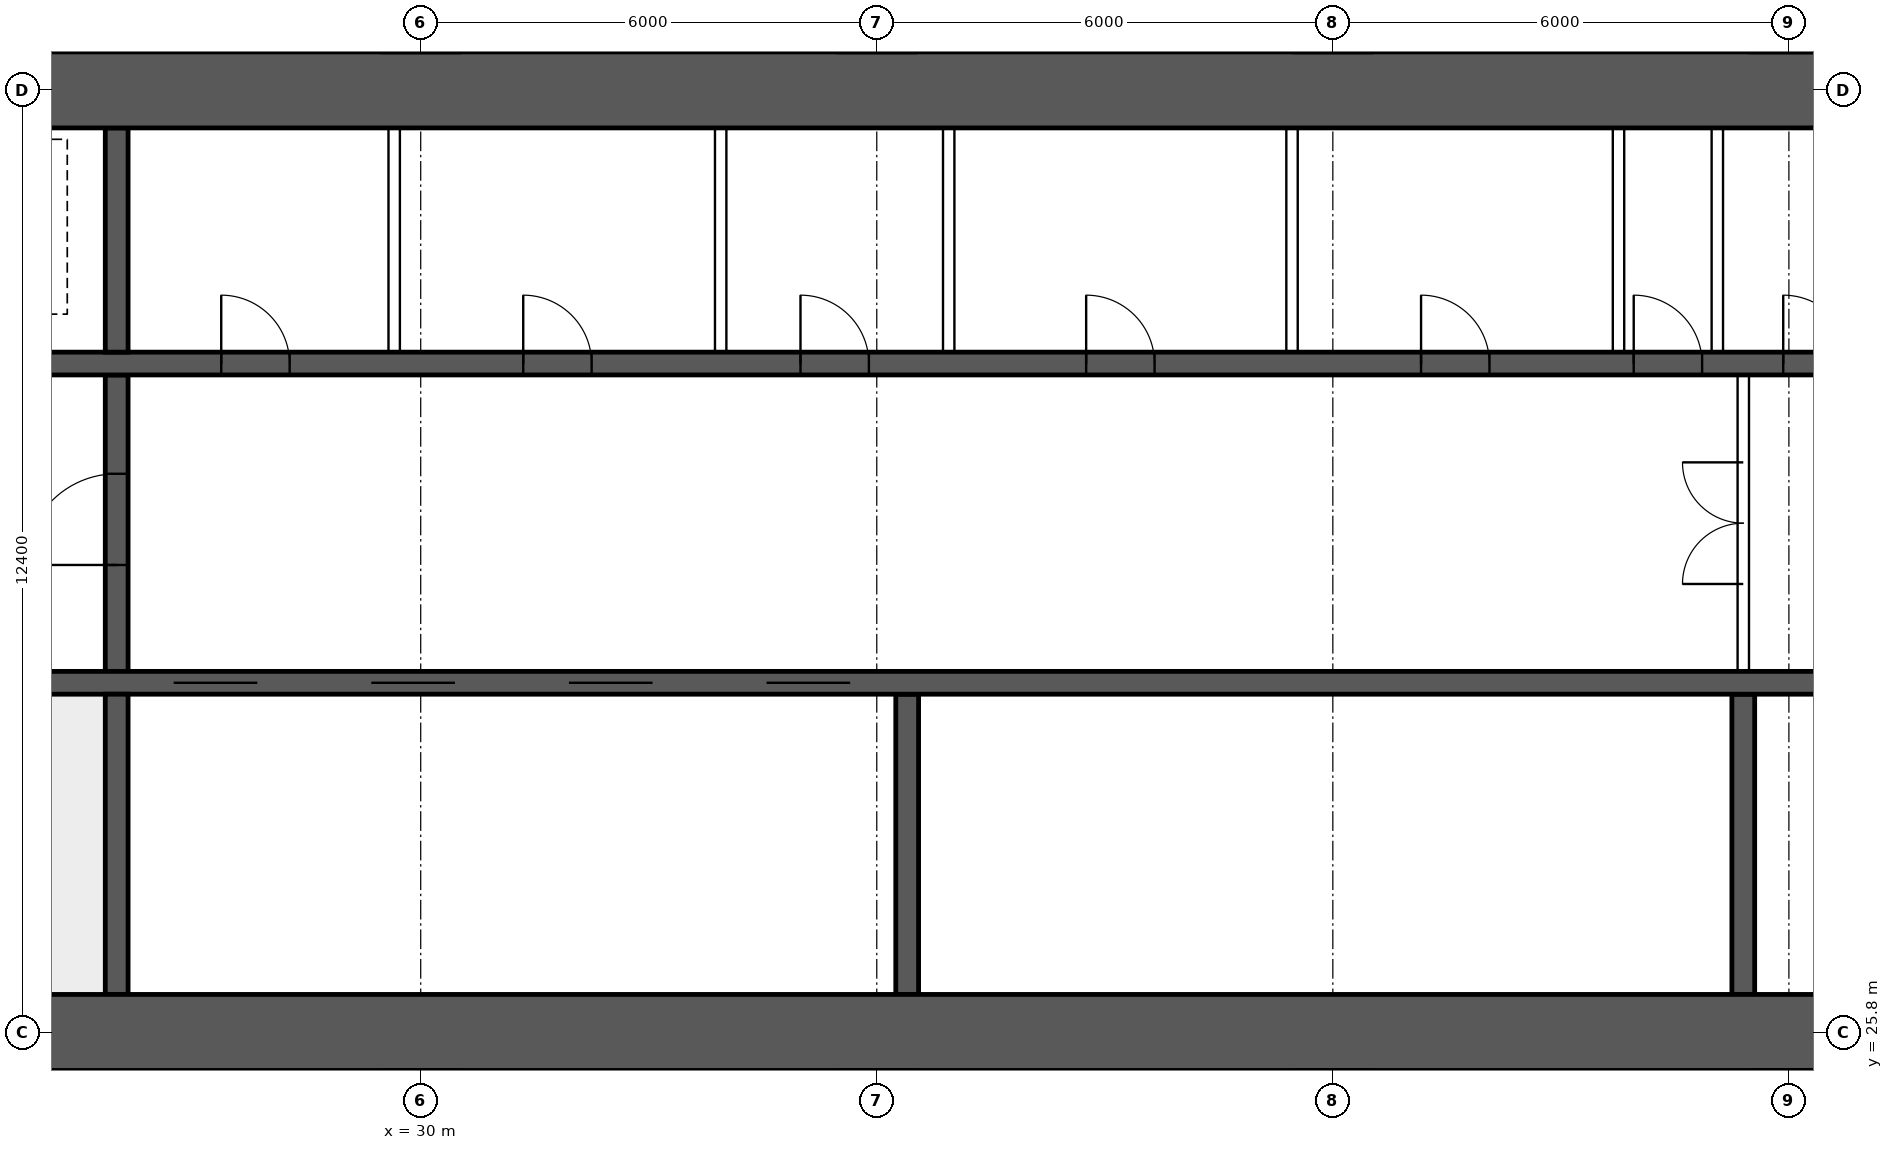
"""IFC4 building model, lengths in metres.
Left out: names, types, materials, properties, quantities, classifications, styles, units other than length and angle.
Written with IfcOpenShell. Run it as: python <this file> out.ifc"""

import sys

from ifc_helpers import new_model, si_unit, direction, frame, frame_2d, origin, place, context, subcontext, project, spatial, rectangle, extrude, element, fill, save


model = new_model("IFC4")
c1 = context("Model", 3, precision=1e-05, world=origin(), true_north=direction((0.0, 1.0)))
c2 = subcontext(c1, "Body", "Model", "MODEL_VIEW")
j1 = project(units=[si_unit("LENGTHUNIT", "METRE"), si_unit("PLANEANGLEUNIT", "RADIAN")], contexts=[c1])
p1 = place(None, origin())
s1 = spatial("IfcSite", under=j1, at=p1, CompositionType="ELEMENT")
p2 = place(p1, origin())
s2 = spatial("IfcBuilding", under=s1, at=p2, CompositionType="ELEMENT")
p3 = place(p2, frame((0.0, 0.0, 31.45)))
s3 = spatial("IfcBuildingStorey", under=s2, at=p3, CompositionType="ELEMENT", Elevation=31.45)
for number, where, z_axis, x_axis in (
    (1, (18.0, 25.8, 0.0), (0.0, 0.0, 1.0), (1.0, 0.0, 0.0)),
    (2, (18.0, 38.2, 0.0), (0.0, 0.0, 1.0), (1.0, 0.0, 0.0)),
):
    element("IfcWall", number, at=place(p3, frame(where, z_axis=z_axis, x_axis=x_axis)), inside=s3, PredefinedType="SHEAR", context=c2, shape_type="SweptSolid", body=[
        extrude(rectangle(XDim=48.0, YDim=1.0, at=frame_2d((24.0, 0.0))), origin(), (0.0, 0.0, 1.0), 3.75),
    ])
p4 = place(p3, frame((18.5, 30.4, 0.0), z_axis=(0.0, 0.0, 1.0), x_axis=(1.0, 0.0, 0.0)))
e3 = element("IfcWall", 3, at=p4, inside=s3, PredefinedType="SHEAR", context=c2, shape_type="SweptSolid", body=[
    extrude(rectangle(XDim=47.0, YDim=0.3, at=frame_2d((23.5, 0.0))), origin(), (0.0, 0.0, 1.0), 3.75),
])
p5 = place(p4, frame((0.4, 0.0, 0.0)))
e4 = element("IfcOpeningElement", 4, at=p5, cuts=e3, PredefinedType="OPENING", context=c2, shape_type="SweptSolid", body=[
    extrude(rectangle(XDim=1.0, YDim=2.1, at=frame_2d((0.5, 1.05))), frame((0.0, 0.16, 0.0), z_axis=(0.0, -1.0, 0.0), x_axis=(1.0, 0.0, 0.0)), (0.0, 0.0, 1.0), 0.32),
])
p6 = place(p4, frame((45.6, 0.0, 0.0)))
e5 = element("IfcOpeningElement", 5, at=p6, cuts=e3, PredefinedType="OPENING", context=c2, shape_type="SweptSolid", body=[
    extrude(rectangle(XDim=1.0, YDim=2.1, at=frame_2d((0.5, 1.05))), frame((0.0, 0.16, 0.0), z_axis=(0.0, -1.0, 0.0), x_axis=(1.0, 0.0, 0.0)), (0.0, 0.0, 1.0), 0.32),
])
p7 = place(p4, frame((8.25, 0.0, 0.0)))
e6 = element("IfcOpeningElement", 6, at=p7, cuts=e3, PredefinedType="OPENING", context=c2, shape_type="SweptSolid", body=[
    extrude(rectangle(XDim=1.1, YDim=2.1, at=frame_2d((0.55, 1.05))), frame((0.0, 0.16, 0.0), z_axis=(0.0, -1.0, 0.0), x_axis=(1.0, 0.0, 0.0)), (0.0, 0.0, 1.0), 0.32),
])
p8 = place(p4, frame((10.85, 0.0, 0.0)))
e7 = element("IfcOpeningElement", 7, at=p8, cuts=e3, PredefinedType="OPENING", context=c2, shape_type="SweptSolid", body=[
    extrude(rectangle(XDim=1.1, YDim=2.1, at=frame_2d((0.55, 1.05))), frame((0.0, 0.16, 0.0), z_axis=(0.0, -1.0, 0.0), x_axis=(1.0, 0.0, 0.0)), (0.0, 0.0, 1.0), 0.32),
])
p9 = place(p4, frame((13.45, 0.0, 0.0)))
e8 = element("IfcOpeningElement", 8, at=p9, cuts=e3, PredefinedType="OPENING", context=c2, shape_type="SweptSolid", body=[
    extrude(rectangle(XDim=1.1, YDim=2.1, at=frame_2d((0.55, 1.05))), frame((0.0, 0.16, 0.0), z_axis=(0.0, -1.0, 0.0), x_axis=(1.0, 0.0, 0.0)), (0.0, 0.0, 1.0), 0.32),
])
p10 = place(p4, frame((16.05, 0.0, 0.0)))
e9 = element("IfcOpeningElement", 9, at=p10, cuts=e3, PredefinedType="OPENING", context=c2, shape_type="SweptSolid", body=[
    extrude(rectangle(XDim=1.1, YDim=2.1, at=frame_2d((0.55, 1.05))), frame((0.0, 0.16, 0.0), z_axis=(0.0, -1.0, 0.0), x_axis=(1.0, 0.0, 0.0)), (0.0, 0.0, 1.0), 0.32),
])
p11 = place(p4, frame((30.117, 0.0, 0.0)))
e10 = element("IfcOpeningElement", 10, at=p11, cuts=e3, PredefinedType="OPENING", context=c2, shape_type="SweptSolid", body=[
    extrude(rectangle(XDim=1.1, YDim=2.1, at=frame_2d((0.55, 1.05))), frame((0.0, 0.16, 0.0), z_axis=(0.0, -1.0, 0.0), x_axis=(1.0, 0.0, 0.0)), (0.0, 0.0, 1.0), 0.32),
])
p12 = place(p4, frame((33.65, 0.0, 0.0)))
e11 = element("IfcOpeningElement", 11, at=p12, cuts=e3, PredefinedType="OPENING", context=c2, shape_type="SweptSolid", body=[
    extrude(rectangle(XDim=1.1, YDim=2.1, at=frame_2d((0.55, 1.05))), frame((0.0, 0.16, 0.0), z_axis=(0.0, -1.0, 0.0), x_axis=(1.0, 0.0, 0.0)), (0.0, 0.0, 1.0), 0.32),
])
p13 = place(p4, frame((37.183, 0.0, 0.0)))
e12 = element("IfcOpeningElement", 12, at=p13, cuts=e3, PredefinedType="OPENING", context=c2, shape_type="SweptSolid", body=[
    extrude(rectangle(XDim=1.1, YDim=2.1, at=frame_2d((0.55, 1.05))), frame((0.0, 0.16, 0.0), z_axis=(0.0, -1.0, 0.0), x_axis=(1.0, 0.0, 0.0)), (0.0, 0.0, 1.0), 0.32),
])
p14 = place(p3, frame((18.5, 34.6, 0.0), z_axis=(0.0, 0.0, 1.0), x_axis=(1.0, 0.0, 0.0)))
e13 = element("IfcWall", 13, at=p14, inside=s3, PredefinedType="SHEAR", context=c2, shape_type="SweptSolid", body=[
    extrude(rectangle(XDim=47.0, YDim=0.3, at=frame_2d((23.5, 0.0))), origin(), (0.0, 0.0, 1.0), 3.75),
])
p15 = place(p14, frame((0.9, 0.0, 0.0)))
e14 = element("IfcOpeningElement", 14, at=p15, cuts=e13, PredefinedType="OPENING", context=c2, shape_type="SweptSolid", body=[
    extrude(rectangle(XDim=1.1, YDim=2.1, at=frame_2d((0.55, 1.05))), frame((0.0, 0.16, 0.0), z_axis=(0.0, -1.0, 0.0), x_axis=(1.0, 0.0, 0.0)), (0.0, 0.0, 1.0), 0.32),
])
p16 = place(p14, frame((45.0, 0.0, 0.0)))
e15 = element("IfcOpeningElement", 15, at=p16, cuts=e13, PredefinedType="OPENING", context=c2, shape_type="SweptSolid", body=[
    extrude(rectangle(XDim=1.1, YDim=2.1, at=frame_2d((0.55, 1.05))), frame((0.0, 0.16, 0.0), z_axis=(0.0, -1.0, 0.0), x_axis=(1.0, 0.0, 0.0)), (0.0, 0.0, 1.0), 0.32),
])
p17 = place(p14, frame((4.1, 0.0, 0.0)))
e16 = element("IfcOpeningElement", 16, at=p17, cuts=e13, PredefinedType="OPENING", context=c2, shape_type="SweptSolid", body=[
    extrude(rectangle(XDim=0.9, YDim=2.1, at=frame_2d((0.45, 1.05))), frame((0.0, 0.16, 0.0), z_axis=(0.0, -1.0, 0.0), x_axis=(1.0, 0.0, 0.0)), (0.0, 0.0, 1.0), 0.32),
])
p18 = place(p14, frame((42.0, 0.0, 0.0)))
e17 = element("IfcOpeningElement", 17, at=p18, cuts=e13, PredefinedType="OPENING", context=c2, shape_type="SweptSolid", body=[
    extrude(rectangle(XDim=0.9, YDim=2.1, at=frame_2d((0.45, 1.05))), frame((0.0, 0.16, 0.0), z_axis=(0.0, -1.0, 0.0), x_axis=(1.0, 0.0, 0.0)), (0.0, 0.0, 1.0), 0.32),
])
p19 = place(p14, frame((8.875, 0.0, 0.0)))
e18 = element("IfcOpeningElement", 18, at=p19, cuts=e13, PredefinedType="OPENING", context=c2, shape_type="SweptSolid", body=[
    extrude(rectangle(XDim=0.9, YDim=2.1, at=frame_2d((0.45, 1.05))), frame((0.0, 0.16, 0.0), z_axis=(0.0, -1.0, 0.0), x_axis=(1.0, 0.0, 0.0)), (0.0, 0.0, 1.0), 0.32),
])
p20 = place(p14, frame((12.849, 0.0, 0.0)))
e19 = element("IfcOpeningElement", 19, at=p20, cuts=e13, PredefinedType="OPENING", context=c2, shape_type="SweptSolid", body=[
    extrude(rectangle(XDim=0.9, YDim=2.1, at=frame_2d((0.45, 1.05))), frame((0.0, 0.16, 0.0), z_axis=(0.0, -1.0, 0.0), x_axis=(1.0, 0.0, 0.0)), (0.0, 0.0, 1.0), 0.32),
])
p21 = place(p14, frame((16.496, 0.0, 0.0)))
e20 = element("IfcOpeningElement", 20, at=p21, cuts=e13, PredefinedType="OPENING", context=c2, shape_type="SweptSolid", body=[
    extrude(rectangle(XDim=0.9, YDim=2.1, at=frame_2d((0.45, 1.05))), frame((0.0, 0.16, 0.0), z_axis=(0.0, -1.0, 0.0), x_axis=(1.0, 0.0, 0.0)), (0.0, 0.0, 1.0), 0.32),
])
p22 = place(p14, frame((20.255, 0.0, 0.0)))
e21 = element("IfcOpeningElement", 21, at=p22, cuts=e13, PredefinedType="OPENING", context=c2, shape_type="SweptSolid", body=[
    extrude(rectangle(XDim=0.9, YDim=2.1, at=frame_2d((0.45, 1.05))), frame((0.0, 0.16, 0.0), z_axis=(0.0, -1.0, 0.0), x_axis=(1.0, 0.0, 0.0)), (0.0, 0.0, 1.0), 0.32),
])
p23 = place(p14, frame((24.661, 0.0, 0.0)))
e22 = element("IfcOpeningElement", 22, at=p23, cuts=e13, PredefinedType="OPENING", context=c2, shape_type="SweptSolid", body=[
    extrude(rectangle(XDim=0.9, YDim=2.1, at=frame_2d((0.45, 1.05))), frame((0.0, 0.16, 0.0), z_axis=(0.0, -1.0, 0.0), x_axis=(1.0, 0.0, 0.0)), (0.0, 0.0, 1.0), 0.32),
])
p24 = place(p14, frame((27.458, 0.0, 0.0)))
e23 = element("IfcOpeningElement", 23, at=p24, cuts=e13, PredefinedType="OPENING", context=c2, shape_type="SweptSolid", body=[
    extrude(rectangle(XDim=0.9, YDim=2.1, at=frame_2d((0.45, 1.05))), frame((0.0, 0.16, 0.0), z_axis=(0.0, -1.0, 0.0), x_axis=(1.0, 0.0, 0.0)), (0.0, 0.0, 1.0), 0.32),
])
p25 = place(p14, frame((29.425, 0.0, 0.0)))
e24 = element("IfcOpeningElement", 24, at=p25, cuts=e13, PredefinedType="OPENING", context=c2, shape_type="SweptSolid", body=[
    extrude(rectangle(XDim=0.9, YDim=2.1, at=frame_2d((0.45, 1.05))), frame((0.0, 0.16, 0.0), z_axis=(0.0, -1.0, 0.0), x_axis=(1.0, 0.0, 0.0)), (0.0, 0.0, 1.0), 0.32),
])
p26 = place(p14, frame((31.857, 0.0, 0.0)))
e25 = element("IfcOpeningElement", 25, at=p26, cuts=e13, PredefinedType="OPENING", context=c2, shape_type="SweptSolid", body=[
    extrude(rectangle(XDim=0.9, YDim=2.1, at=frame_2d((0.45, 1.05))), frame((0.0, 0.16, 0.0), z_axis=(0.0, -1.0, 0.0), x_axis=(1.0, 0.0, 0.0)), (0.0, 0.0, 1.0), 0.32),
])
p27 = place(p14, frame((34.592, 0.0, 0.0)))
e26 = element("IfcOpeningElement", 26, at=p27, cuts=e13, PredefinedType="OPENING", context=c2, shape_type="SweptSolid", body=[
    extrude(rectangle(XDim=0.9, YDim=2.1, at=frame_2d((0.45, 1.05))), frame((0.0, 0.16, 0.0), z_axis=(0.0, -1.0, 0.0), x_axis=(1.0, 0.0, 0.0)), (0.0, 0.0, 1.0), 0.32),
])
p28 = place(p14, frame((37.632, 0.0, 0.0)))
e27 = element("IfcOpeningElement", 27, at=p28, cuts=e13, PredefinedType="OPENING", context=c2, shape_type="SweptSolid", body=[
    extrude(rectangle(XDim=0.9, YDim=2.1, at=frame_2d((0.45, 1.05))), frame((0.0, 0.16, 0.0), z_axis=(0.0, -1.0, 0.0), x_axis=(1.0, 0.0, 0.0)), (0.0, 0.0, 1.0), 0.32),
])
p29 = place(p3, frame((26.0, 26.3, 0.0), z_axis=(0.0, 0.0, 1.0), x_axis=(0.0, 1.0, 0.0)))
e28 = element("IfcWall", 28, at=p29, inside=s3, PredefinedType="SHEAR", context=c2, shape_type="SweptSolid", body=[
    extrude(rectangle(XDim=3.95, YDim=0.3, at=frame_2d((1.975, 0.0))), origin(), (0.0, 0.0, 1.0), 3.75),
])
p30 = place(p3, frame((26.0, 30.55, 0.0), z_axis=(0.0, 0.0, 1.0), x_axis=(0.0, 1.0, 0.0)))
e29 = element("IfcWall", 29, at=p30, inside=s3, PredefinedType="SHEAR", context=c2, shape_type="SweptSolid", body=[
    extrude(rectangle(XDim=3.9, YDim=0.3, at=frame_2d((1.95, 0.0))), origin(), (0.0, 0.0, 1.0), 3.75),
])
p31 = place(p30, frame((1.4, 0.0, 0.0)))
e30 = element("IfcOpeningElement", 30, at=p31, cuts=e29, PredefinedType="OPENING", context=c2, shape_type="SweptSolid", body=[
    extrude(rectangle(XDim=1.2, YDim=2.1, at=frame_2d((0.6, 1.05))), frame((0.0, 0.16, 0.0), z_axis=(0.0, -1.0, 0.0), x_axis=(1.0, 0.0, 0.0)), (0.0, 0.0, 1.0), 0.32),
])
p32 = place(p3, frame((26.0, 34.75, 0.0), z_axis=(0.0, 0.0, 1.0), x_axis=(0.0, 1.0, 0.0)))
e31 = element("IfcWall", 31, at=p32, inside=s3, PredefinedType="SHEAR", context=c2, shape_type="SweptSolid", body=[
    extrude(rectangle(XDim=2.95, YDim=0.3, at=frame_2d((1.475, 0.0))), origin(), (0.0, 0.0, 1.0), 3.75),
])
for number, where, z_axis, x_axis in (
    (32, (36.4, 26.3, 0.0), (0.0, 0.0, 1.0), (0.0, 1.0, 0.0)),
    (33, (47.4, 26.3, 0.0), (0.0, 0.0, 1.0), (0.0, 1.0, 0.0)),
):
    element("IfcWall", number, at=place(p3, frame(where, z_axis=z_axis, x_axis=x_axis)), inside=s3, PredefinedType="SHEAR", context=c2, shape_type="SweptSolid", body=[
        extrude(rectangle(XDim=3.95, YDim=0.3, at=frame_2d((1.975, 0.0))), origin(), (0.0, 0.0, 1.0), 3.75),
    ])
p33 = place(p3, frame((47.4, 30.55, 0.0), z_axis=(0.0, 0.0, 1.0), x_axis=(0.0, 1.0, 0.0)))
e34 = element("IfcWall", 34, at=p33, inside=s3, PredefinedType="SOLIDWALL", context=c2, shape_type="SweptSolid", body=[
    extrude(rectangle(XDim=3.9, YDim=0.15, at=frame_2d((1.95, 0.0))), origin(), (0.0, 0.0, 1.0), 3.5),
])
p34 = place(p33, frame((1.15, 0.0, 0.0)))
e35 = element("IfcOpeningElement", 35, at=p34, cuts=e34, PredefinedType="OPENING", context=c2, shape_type="SweptSolid", body=[
    extrude(rectangle(XDim=1.6, YDim=2.1, at=frame_2d((0.8, 1.05))), frame((0.0, 0.085, 0.0), z_axis=(0.0, -1.0, 0.0), x_axis=(1.0, 0.0, 0.0)), (0.0, 0.0, 1.0), 0.17),
])
for number, where, z_axis, x_axis in (
    (36, (29.651, 34.75, 0.0), (0.0, 0.0, 1.0), (0.0, 1.0, 0.0)),
    (37, (33.946, 34.75, 0.0), (0.0, 0.0, 1.0), (0.0, 1.0, 0.0)),
    (38, (36.946, 34.75, 0.0), (0.0, 0.0, 1.0), (0.0, 1.0, 0.0)),
    (39, (41.463, 34.75, 0.0), (0.0, 0.0, 1.0), (0.0, 1.0, 0.0)),
    (40, (45.758, 34.75, 0.0), (0.0, 0.0, 1.0), (0.0, 1.0, 0.0)),
    (41, (47.058, 34.75, 0.0), (0.0, 0.0, 1.0), (0.0, 1.0, 0.0)),
):
    element("IfcWall", number, at=place(p3, frame(where, z_axis=z_axis, x_axis=x_axis)), inside=s3, PredefinedType="SOLIDWALL", context=c2, shape_type="SweptSolid", body=[
        extrude(rectangle(XDim=2.95, YDim=0.15, at=frame_2d((1.475, 0.0))), origin(), (0.0, 0.0, 1.0), 3.5),
    ])
for number, where, z_axis, x_axis in (
    (42, (27.075, 14.9, 0.0), (0.0, 0.0, 1.0), (0.0, 1.0, 0.0)),
    (43, (38.81, 14.9, 0.0), (0.0, 0.0, 1.0), (0.0, 1.0, 0.0)),
):
    element("IfcWall", number, at=place(p3, frame(where, z_axis=z_axis, x_axis=x_axis)), inside=s3, PredefinedType="PARTITIONING", context=c2, shape_type="SweptSolid", body=[
        extrude(rectangle(XDim=10.4, YDim=0.15, at=frame_2d((5.2, 0.0))), origin(), (0.0, 0.0, 1.0), 3.5),
    ])
p35 = place(p34, origin())
e44 = element("IfcDoor", 44, at=p35, inside=s3, OperationType="DOUBLE_DOOR_SINGLE_SWING", PredefinedType="DOOR", context=c2, shape_type="SweptSolid", body=[
    extrude(rectangle(XDim=1.6, YDim=2.1, at=frame_2d((0.8, 1.05))), frame((0.0, 0.025, 0.0), z_axis=(0.0, -1.0, 0.0), x_axis=(1.0, 0.0, 0.0)), (0.0, 0.0, 1.0), 0.05),
])
fill(e35, e44)
p36 = place(p31, origin())
e45 = element("IfcDoor", 45, at=p36, inside=s3, OperationType="SINGLE_SWING_LEFT", PredefinedType="DOOR", context=c2, shape_type="SweptSolid", body=[
    extrude(rectangle(XDim=1.2, YDim=2.1, at=frame_2d((0.6, 1.05))), frame((0.0, 0.025, 0.0), z_axis=(0.0, -1.0, 0.0), x_axis=(1.0, 0.0, 0.0)), (0.0, 0.0, 1.0), 0.05),
])
fill(e30, e45)
p37 = place(p19, origin())
e46 = element("IfcDoor", 46, at=p37, inside=s3, OperationType="SINGLE_SWING_LEFT", PredefinedType="DOOR", context=c2, shape_type="SweptSolid", body=[
    extrude(rectangle(XDim=0.9, YDim=2.1, at=frame_2d((0.45, 1.05))), frame((0.0, 0.025, 0.0), z_axis=(0.0, -1.0, 0.0), x_axis=(1.0, 0.0, 0.0)), (0.0, 0.0, 1.0), 0.05),
])
fill(e18, e46)
p38 = place(p20, origin())
e47 = element("IfcDoor", 47, at=p38, inside=s3, OperationType="SINGLE_SWING_LEFT", PredefinedType="DOOR", context=c2, shape_type="SweptSolid", body=[
    extrude(rectangle(XDim=0.9, YDim=2.1, at=frame_2d((0.45, 1.05))), frame((0.0, 0.025, 0.0), z_axis=(0.0, -1.0, 0.0), x_axis=(1.0, 0.0, 0.0)), (0.0, 0.0, 1.0), 0.05),
])
fill(e19, e47)
p39 = place(p21, origin())
e48 = element("IfcDoor", 48, at=p39, inside=s3, OperationType="SINGLE_SWING_LEFT", PredefinedType="DOOR", context=c2, shape_type="SweptSolid", body=[
    extrude(rectangle(XDim=0.9, YDim=2.1, at=frame_2d((0.45, 1.05))), frame((0.0, 0.025, 0.0), z_axis=(0.0, -1.0, 0.0), x_axis=(1.0, 0.0, 0.0)), (0.0, 0.0, 1.0), 0.05),
])
fill(e20, e48)
p40 = place(p22, origin())
e49 = element("IfcDoor", 49, at=p40, inside=s3, OperationType="SINGLE_SWING_LEFT", PredefinedType="DOOR", context=c2, shape_type="SweptSolid", body=[
    extrude(rectangle(XDim=0.9, YDim=2.1, at=frame_2d((0.45, 1.05))), frame((0.0, 0.025, 0.0), z_axis=(0.0, -1.0, 0.0), x_axis=(1.0, 0.0, 0.0)), (0.0, 0.0, 1.0), 0.05),
])
fill(e21, e49)
p41 = place(p23, origin())
e50 = element("IfcDoor", 50, at=p41, inside=s3, OperationType="SINGLE_SWING_LEFT", PredefinedType="DOOR", context=c2, shape_type="SweptSolid", body=[
    extrude(rectangle(XDim=0.9, YDim=2.1, at=frame_2d((0.45, 1.05))), frame((0.0, 0.025, 0.0), z_axis=(0.0, -1.0, 0.0), x_axis=(1.0, 0.0, 0.0)), (0.0, 0.0, 1.0), 0.05),
])
fill(e22, e50)
p42 = place(p24, origin())
e51 = element("IfcDoor", 51, at=p42, inside=s3, OperationType="SINGLE_SWING_LEFT", PredefinedType="DOOR", context=c2, shape_type="SweptSolid", body=[
    extrude(rectangle(XDim=0.9, YDim=2.1, at=frame_2d((0.45, 1.05))), frame((0.0, 0.025, 0.0), z_axis=(0.0, -1.0, 0.0), x_axis=(1.0, 0.0, 0.0)), (0.0, 0.0, 1.0), 0.05),
])
fill(e23, e51)
p43 = place(p25, origin())
e52 = element("IfcDoor", 52, at=p43, inside=s3, OperationType="SINGLE_SWING_LEFT", PredefinedType="DOOR", context=c2, shape_type="SweptSolid", body=[
    extrude(rectangle(XDim=0.9, YDim=2.1, at=frame_2d((0.45, 1.05))), frame((0.0, 0.025, 0.0), z_axis=(0.0, -1.0, 0.0), x_axis=(1.0, 0.0, 0.0)), (0.0, 0.0, 1.0), 0.05),
])
fill(e24, e52)
p44 = place(p7, origin())
e53 = element("IfcDoor", 53, at=p44, inside=s3, OperationType="DOUBLE_DOOR_SLIDING", PredefinedType="DOOR", context=c2, shape_type="SweptSolid", body=[
    extrude(rectangle(XDim=1.1, YDim=2.1, at=frame_2d((0.55, 1.05))), frame((0.0, 0.025, 0.0), z_axis=(0.0, -1.0, 0.0), x_axis=(1.0, 0.0, 0.0)), (0.0, 0.0, 1.0), 0.05),
])
fill(e6, e53)
p45 = place(p8, origin())
e54 = element("IfcDoor", 54, at=p45, inside=s3, OperationType="DOUBLE_DOOR_SLIDING", PredefinedType="DOOR", context=c2, shape_type="SweptSolid", body=[
    extrude(rectangle(XDim=1.1, YDim=2.1, at=frame_2d((0.55, 1.05))), frame((0.0, 0.025, 0.0), z_axis=(0.0, -1.0, 0.0), x_axis=(1.0, 0.0, 0.0)), (0.0, 0.0, 1.0), 0.05),
])
fill(e7, e54)
p46 = place(p9, origin())
e55 = element("IfcDoor", 55, at=p46, inside=s3, OperationType="DOUBLE_DOOR_SLIDING", PredefinedType="DOOR", context=c2, shape_type="SweptSolid", body=[
    extrude(rectangle(XDim=1.1, YDim=2.1, at=frame_2d((0.55, 1.05))), frame((0.0, 0.025, 0.0), z_axis=(0.0, -1.0, 0.0), x_axis=(1.0, 0.0, 0.0)), (0.0, 0.0, 1.0), 0.05),
])
fill(e8, e55)
p47 = place(p10, origin())
e56 = element("IfcDoor", 56, at=p47, inside=s3, OperationType="DOUBLE_DOOR_SLIDING", PredefinedType="DOOR", context=c2, shape_type="SweptSolid", body=[
    extrude(rectangle(XDim=1.1, YDim=2.1, at=frame_2d((0.55, 1.05))), frame((0.0, 0.025, 0.0), z_axis=(0.0, -1.0, 0.0), x_axis=(1.0, 0.0, 0.0)), (0.0, 0.0, 1.0), 0.05),
])
fill(e9, e56)
save(model, sys.argv[1])
